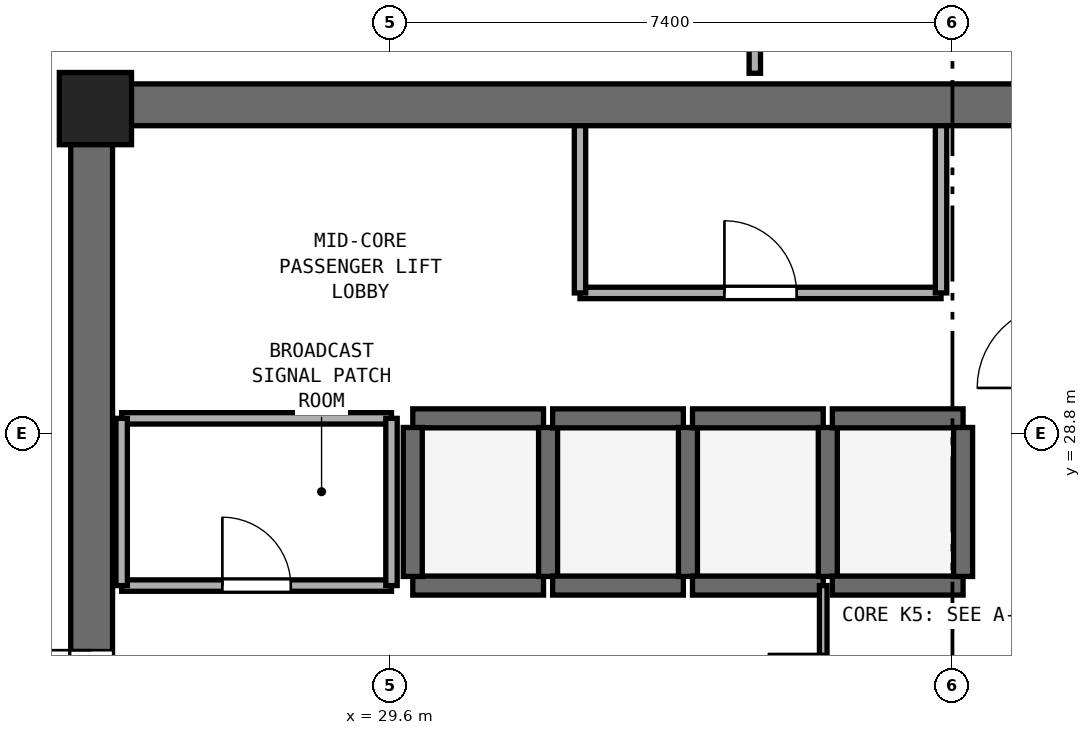
"""IFC4 building model, lengths in metres.
Left out: names, types, materials, properties, quantities, classifications, styles, units other than length and angle.
Written with IfcOpenShell. Run it as: python <this file> out.ifc"""

import sys

from ifc_helpers import new_model, si_unit, direction, frame, frame_2d, origin, origin_2d, place, context, subcontext, project, spatial, rectangle, extrude, element, fill, save


model = new_model("IFC4")
c1 = context("Model", 3, precision=1e-05, world=origin(), true_north=direction((0.0, 1.0)))
c2 = subcontext(c1, "Body", "Model", "MODEL_VIEW")
j1 = project(units=[si_unit("LENGTHUNIT", "METRE"), si_unit("PLANEANGLEUNIT", "RADIAN")], contexts=[c1])
p1 = place(None, origin())
s1 = spatial("IfcSite", under=j1, at=p1, CompositionType="ELEMENT")
p2 = place(p1, origin())
s2 = spatial("IfcBuilding", under=s1, at=p2, CompositionType="ELEMENT")
p3 = place(p2, frame((0.0, 0.0, 208.6)))
s3 = spatial("IfcBuildingStorey", under=s2, at=p3, CompositionType="ELEMENT", Elevation=208.6)
p4 = place(p3, frame((25.4, 33.125, 0.0), z_axis=(0.0, 0.0, 1.0), x_axis=(1.0, 0.0, 0.0)))
e1 = element("IfcWall", 1, at=p4, inside=s3, PredefinedType="SHEAR", context=c2, shape_type="SweptSolid", body=[
    extrude(rectangle(XDim=23.2, YDim=0.55, at=frame_2d((11.6, 0.0))), origin(), (0.0, 0.0, 1.0), 3.54),
])
p5 = place(p3, frame((25.675, 17.55, 0.0), z_axis=(0.0, 0.0, 1.0), x_axis=(0.0, 1.0, 0.0)))
e2 = element("IfcWall", 2, at=p5, inside=s3, PredefinedType="SHEAR", context=c2, shape_type="SweptSolid", body=[
    extrude(rectangle(XDim=15.3, YDim=0.55, at=frame_2d((7.65, 0.0))), origin(), (0.0, 0.0, 1.0), 3.54),
])
p6 = place(p5, frame((6.9, 0.0, 0.0)))
e3 = element("IfcOpeningElement", 3, at=p6, cuts=e2, PredefinedType="OPENING", context=c2, shape_type="SweptSolid", body=[
    extrude(rectangle(XDim=1.5, YDim=2.15, at=frame_2d((0.75, 1.075))), frame((0.0, 0.285, 0.0), z_axis=(0.0, -1.0, 0.0), x_axis=(1.0, 0.0, 0.0)), (0.0, 0.0, 1.0), 0.57),
])
p7 = place(p3, frame((25.725, 33.075, 0.0), z_axis=(0.0, 0.0, 1.0), x_axis=(1.0, 0.0, 0.0)))
e4 = element("IfcColumn", 4, at=p7, inside=s3, PredefinedType="PILASTER", context=c2, shape_type="SweptSolid", body=[
    extrude(rectangle(XDim=0.95, YDim=0.95, at=origin_2d()), origin(), (0.0, 0.0, 1.0), 3.8),
])
for number, where, z_axis, x_axis in (
    (5, (29.9, 26.8, 0.0), (0.0, 0.0, 1.0), (1.0, 0.0, 0.0)),
    (6, (29.9, 29.0, 0.0), (0.0, 0.0, 1.0), (1.0, 0.0, 0.0)),
):
    element("IfcWall", number, at=place(p3, frame(where, z_axis=z_axis, x_axis=x_axis)), inside=s3, PredefinedType="SHEAR", context=c2, shape_type="SweptSolid", body=[
        extrude(rectangle(XDim=1.72, YDim=0.25, at=frame_2d((0.86, 0.0))), origin(), (0.0, 0.0, 1.0), 3.54),
    ])
for number, where, z_axis, x_axis in (
    (7, (29.9, 26.92, 0.0), (0.0, 0.0, 1.0), (0.0, 1.0, 0.0)),
    (8, (31.68, 26.92, 0.0), (0.0, 0.0, 1.0), (0.0, 1.0, 0.0)),
):
    element("IfcWall", number, at=place(p3, frame(where, z_axis=z_axis, x_axis=x_axis)), inside=s3, PredefinedType="SHEAR", context=c2, shape_type="SweptSolid", body=[
        extrude(rectangle(XDim=1.96, YDim=0.25, at=frame_2d((0.98, 0.0))), origin(), (0.0, 0.0, 1.0), 3.54),
    ])
for number, where, z_axis, x_axis in (
    (9, (31.74, 26.8, 0.0), (0.0, 0.0, 1.0), (1.0, 0.0, 0.0)),
    (10, (31.74, 29.0, 0.0), (0.0, 0.0, 1.0), (1.0, 0.0, 0.0)),
):
    element("IfcWall", number, at=place(p3, frame(where, z_axis=z_axis, x_axis=x_axis)), inside=s3, PredefinedType="SHEAR", context=c2, shape_type="SweptSolid", body=[
        extrude(rectangle(XDim=1.72, YDim=0.25, at=frame_2d((0.86, 0.0))), origin(), (0.0, 0.0, 1.0), 3.54),
    ])
p8 = place(p3, frame((33.52, 26.92, 0.0), z_axis=(0.0, 0.0, 1.0), x_axis=(0.0, 1.0, 0.0)))
e11 = element("IfcWall", 11, at=p8, inside=s3, PredefinedType="SHEAR", context=c2, shape_type="SweptSolid", body=[
    extrude(rectangle(XDim=1.96, YDim=0.25, at=frame_2d((0.98, 0.0))), origin(), (0.0, 0.0, 1.0), 3.54),
])
for number, where, z_axis, x_axis in (
    (12, (33.58, 26.8, 0.0), (0.0, 0.0, 1.0), (1.0, 0.0, 0.0)),
    (13, (33.58, 29.0, 0.0), (0.0, 0.0, 1.0), (1.0, 0.0, 0.0)),
):
    element("IfcWall", number, at=place(p3, frame(where, z_axis=z_axis, x_axis=x_axis)), inside=s3, PredefinedType="SHEAR", context=c2, shape_type="SweptSolid", body=[
        extrude(rectangle(XDim=1.72, YDim=0.25, at=frame_2d((0.86, 0.0))), origin(), (0.0, 0.0, 1.0), 3.54),
    ])
p9 = place(p3, frame((35.36, 26.92, 0.0), z_axis=(0.0, 0.0, 1.0), x_axis=(0.0, 1.0, 0.0)))
e14 = element("IfcWall", 14, at=p9, inside=s3, PredefinedType="SHEAR", context=c2, shape_type="SweptSolid", body=[
    extrude(rectangle(XDim=1.96, YDim=0.25, at=frame_2d((0.98, 0.0))), origin(), (0.0, 0.0, 1.0), 3.54),
])
for number, where, z_axis, x_axis in (
    (15, (35.42, 26.8, 0.0), (0.0, 0.0, 1.0), (1.0, 0.0, 0.0)),
    (16, (35.42, 29.0, 0.0), (0.0, 0.0, 1.0), (1.0, 0.0, 0.0)),
):
    element("IfcWall", number, at=place(p3, frame(where, z_axis=z_axis, x_axis=x_axis)), inside=s3, PredefinedType="SHEAR", context=c2, shape_type="SweptSolid", body=[
        extrude(rectangle(XDim=1.72, YDim=0.25, at=frame_2d((0.86, 0.0))), origin(), (0.0, 0.0, 1.0), 3.54),
    ])
p10 = place(p3, frame((37.14, 26.92, 0.0), z_axis=(0.0, 0.0, 1.0), x_axis=(0.0, 1.0, 0.0)))
e17 = element("IfcWall", 17, at=p10, inside=s3, PredefinedType="SHEAR", context=c2, shape_type="SweptSolid", body=[
    extrude(rectangle(XDim=1.96, YDim=0.25, at=frame_2d((0.98, 0.0))), origin(), (0.0, 0.0, 1.0), 3.54),
])
p11 = place(p3, frame((32.1, 30.65, 0.0), z_axis=(0.0, 0.0, 1.0), x_axis=(1.0, 0.0, 0.0)))
e18 = element("IfcWall", 18, at=p11, inside=s3, PredefinedType="PARTITIONING", context=c2, shape_type="SweptSolid", body=[
    extrude(rectangle(XDim=4.75, YDim=0.15, at=frame_2d((2.375, 0.0))), origin(), (0.0, 0.0, 1.0), 3.54),
])
p12 = place(p11, frame((1.9, 0.0, 0.0)))
e19 = element("IfcOpeningElement", 19, at=p12, cuts=e18, PredefinedType="OPENING", context=c2, shape_type="SweptSolid", body=[
    extrude(rectangle(XDim=0.95, YDim=2.1, at=frame_2d((0.475, 1.05))), frame((0.0, 0.085, 0.0), z_axis=(0.0, -1.0, 0.0), x_axis=(1.0, 0.0, 0.0)), (0.0, 0.0, 1.0), 0.17),
])
for number, where, z_axis, x_axis in (
    (20, (32.1, 30.65, 0.0), (0.0, 0.0, 1.0), (0.0, 1.0, 0.0)),
    (21, (36.85, 30.65, 0.0), (0.0, 0.0, 1.0), (0.0, 1.0, 0.0)),
):
    element("IfcWall", number, at=place(p3, frame(where, z_axis=z_axis, x_axis=x_axis)), inside=s3, PredefinedType="PARTITIONING", context=c2, shape_type="SweptSolid", body=[
        extrude(rectangle(XDim=2.2, YDim=0.15, at=frame_2d((1.1, 0.0))), origin(), (0.0, 0.0, 1.0), 3.54),
    ])
p13 = place(p3, frame((26.07, 26.8, 0.0), z_axis=(0.0, 0.0, 1.0), x_axis=(1.0, 0.0, 0.0)))
e22 = element("IfcWall", 22, at=p13, inside=s3, PredefinedType="PARTITIONING", context=c2, shape_type="SweptSolid", body=[
    extrude(rectangle(XDim=3.55, YDim=0.15, at=frame_2d((1.775, 0.0))), origin(), (0.0, 0.0, 1.0), 3.54),
])
p14 = place(p13, frame((1.325, 0.0, 0.0)))
e23 = element("IfcOpeningElement", 23, at=p14, cuts=e22, PredefinedType="OPENING", context=c2, shape_type="SweptSolid", body=[
    extrude(rectangle(XDim=0.9, YDim=2.1, at=frame_2d((0.45, 1.05))), frame((0.0, 0.085, 0.0), z_axis=(0.0, -1.0, 0.0), x_axis=(1.0, 0.0, 0.0)), (0.0, 0.0, 1.0), 0.17),
])
p15 = place(p3, frame((26.07, 29.0, 0.0), z_axis=(0.0, 0.0, 1.0), x_axis=(1.0, 0.0, 0.0)))
e24 = element("IfcWall", 24, at=p15, inside=s3, PredefinedType="PARTITIONING", context=c2, shape_type="SweptSolid", body=[
    extrude(rectangle(XDim=3.55, YDim=0.15, at=frame_2d((1.775, 0.0))), origin(), (0.0, 0.0, 1.0), 3.54),
])
p16 = place(p3, frame((26.07, 26.8, 0.0), z_axis=(0.0, 0.0, 1.0), x_axis=(0.0, 1.0, 0.0)))
e25 = element("IfcWall", 25, at=p16, inside=s3, PredefinedType="PARTITIONING", context=c2, shape_type="SweptSolid", body=[
    extrude(rectangle(XDim=2.2, YDim=0.15, at=frame_2d((1.1, 0.0))), origin(), (0.0, 0.0, 1.0), 2.64),
])
p17 = place(p3, frame((29.62, 26.8, 0.0), z_axis=(0.0, 0.0, 1.0), x_axis=(0.0, 1.0, 0.0)))
e26 = element("IfcWall", 26, at=p17, inside=s3, PredefinedType="PARTITIONING", context=c2, shape_type="SweptSolid", body=[
    extrude(rectangle(XDim=2.2, YDim=0.15, at=frame_2d((1.1, 0.0))), origin(), (0.0, 0.0, 1.0), 3.54),
])
p18 = place(p3, frame((35.3, 23.6, 0.0), z_axis=(0.0, 0.0, 1.0), x_axis=(0.0, 1.0, 0.0)))
e27 = element("IfcWall", 27, at=p18, inside=s3, PredefinedType="PARTITIONING", context=c2, shape_type="SweptSolid", body=[
    extrude(rectangle(XDim=3.2, YDim=0.1, at=frame_2d((1.6, 0.0))), origin(), (0.0, 0.0, 1.0), 3.54),
])
p19 = place(p18, frame((0.85, 0.0, 0.0)))
e28 = element("IfcOpeningElement", 28, at=p19, cuts=e27, PredefinedType="OPENING", context=c2, shape_type="SweptSolid", body=[
    extrude(rectangle(XDim=1.45, YDim=2.12, at=frame_2d((0.725, 1.06))), frame((0.0, 0.06, 0.0), z_axis=(0.0, -1.0, 0.0), x_axis=(1.0, 0.0, 0.0)), (0.0, 0.0, 1.0), 0.12),
])
p20 = place(p3, frame((34.4, 33.54, 0.0), z_axis=(0.0, 0.0, 1.0), x_axis=(0.0, 1.0, 0.0)))
e29 = element("IfcWall", 29, at=p20, inside=s3, PredefinedType="PARTITIONING", context=c2, shape_type="SweptSolid", body=[
    extrude(rectangle(XDim=3.71, YDim=0.15, at=frame_2d((1.855, 0.0))), origin(), (0.0, 0.0, 1.0), 3.54),
])
p21 = place(p20, frame((1.355, 0.0, 0.0)))
e30 = element("IfcOpeningElement", 30, at=p21, cuts=e29, PredefinedType="OPENING", context=c2, shape_type="SweptSolid", body=[
    extrude(rectangle(XDim=1.0, YDim=2.12, at=frame_2d((0.5, 1.06))), frame((0.0, 0.085, 0.0), z_axis=(0.0, -1.0, 0.0), x_axis=(1.0, 0.0, 0.0)), (0.0, 0.0, 1.0), 0.17),
])
p22 = place(p6, origin())
e31 = element("IfcDoor", 31, at=p22, inside=s3, OperationType="DOUBLE_DOOR_SINGLE_SWING", PredefinedType="DOOR", context=c2, shape_type="SweptSolid", body=[
    extrude(rectangle(XDim=1.5, YDim=2.15, at=frame_2d((0.75, 1.075))), frame((0.0, 0.025, 0.0), z_axis=(0.0, -1.0, 0.0), x_axis=(1.0, 0.0, 0.0)), (0.0, 0.0, 1.0), 0.05),
])
fill(e3, e31)
p23 = place(p12, origin())
e32 = element("IfcDoor", 32, at=p23, inside=s3, OperationType="SINGLE_SWING_LEFT", PredefinedType="DOOR", context=c2, shape_type="SweptSolid", body=[
    extrude(rectangle(XDim=0.95, YDim=2.1, at=frame_2d((0.475, 1.05))), frame((0.0, 0.025, 0.0), z_axis=(0.0, -1.0, 0.0), x_axis=(1.0, 0.0, 0.0)), (0.0, 0.0, 1.0), 0.05),
])
fill(e19, e32)
p24 = place(p14, origin())
e33 = element("IfcDoor", 33, at=p24, inside=s3, OperationType="SINGLE_SWING_LEFT", PredefinedType="DOOR", context=c2, shape_type="SweptSolid", body=[
    extrude(rectangle(XDim=0.9, YDim=2.1, at=frame_2d((0.45, 1.05))), frame((0.0, 0.025, 0.0), z_axis=(0.0, -1.0, 0.0), x_axis=(1.0, 0.0, 0.0)), (0.0, 0.0, 1.0), 0.05),
])
fill(e23, e33)
p25 = place(p19, origin())
e34 = element("IfcDoor", 34, at=p25, inside=s3, OperationType="DOUBLE_DOOR_SINGLE_SWING", PredefinedType="DOOR", context=c2, shape_type="SweptSolid", body=[
    extrude(rectangle(XDim=1.45, YDim=2.12, at=frame_2d((0.725, 1.06))), frame((0.0, 0.025, 0.0), z_axis=(0.0, -1.0, 0.0), x_axis=(1.0, 0.0, 0.0)), (0.0, 0.0, 1.0), 0.05),
])
fill(e28, e34)
save(model, sys.argv[1])
